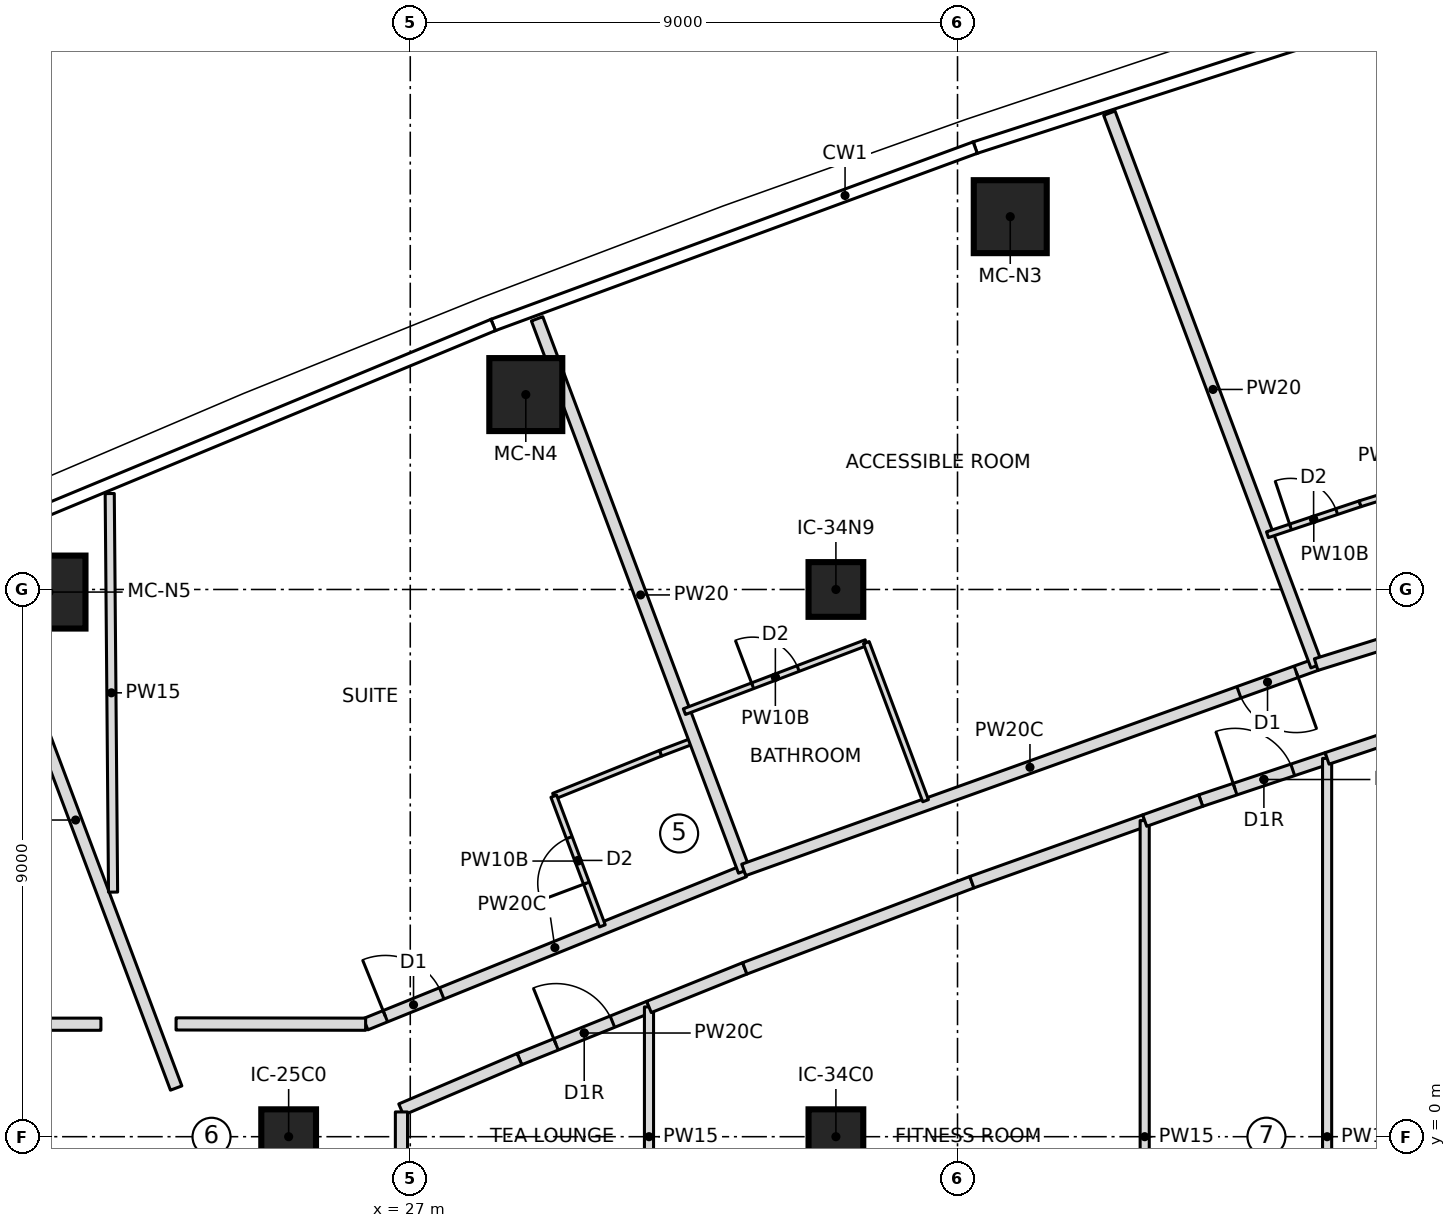
"""IFC4 building model, lengths in metres.
Left out: names, types, materials, properties, quantities, classifications, styles, units other than length and angle.
Written with IfcOpenShell. Run it as: python <this file> out.ifc"""

import sys

from ifc_helpers import new_model, si_unit, direction, frame, frame_2d, origin, origin_2d, place, context, subcontext, project, spatial, rectangle, extrude, element, fill, save


model = new_model("IFC4")
c1 = context("Model", 3, precision=1e-05, world=origin(), true_north=direction((0.0, 1.0)))
c2 = subcontext(c1, "Body", "Model", "MODEL_VIEW")
j1 = project(units=[si_unit("LENGTHUNIT", "METRE"), si_unit("PLANEANGLEUNIT", "RADIAN")], contexts=[c1])
p1 = place(None, origin())
s1 = spatial("IfcSite", under=j1, at=p1, CompositionType="ELEMENT")
p2 = place(p1, origin())
s2 = spatial("IfcBuilding", under=s1, at=p2, CompositionType="ELEMENT")
p3 = place(p2, frame((0.0, 0.0, 235.0)))
s3 = spatial("IfcBuildingStorey", under=s2, at=p3, CompositionType="ELEMENT", Elevation=235.0)
for number, where, z_axis, x_axis in (
    (1, (36.867, 15.132, 0.0), (0.0, 0.0, 1.0), (1.0, 0.0, 0.0)),
    (2, (28.9, 12.205, 0.0), (0.0, 0.0, 1.0), (1.0, 0.0, 0.0)),
    (3, (21.059, 8.958, 0.0), (0.0, 0.0, 1.0), (1.0, 0.0, 0.0)),
):
    element("IfcColumn", number, at=place(p3, frame(where, z_axis=z_axis, x_axis=x_axis)), inside=s3, PredefinedType="COLUMN", context=c2, shape_type="SweptSolid", body=[
        extrude(rectangle(XDim=1.2, YDim=1.2, at=origin_2d()), origin(), (0.0, 0.0, 1.0), 3.55),
    ])
for number, where, z_axis, x_axis in (
    (4, (25.0, 0.0, 0.0), (0.0, 0.0, 1.0), (1.0, 0.0, 0.0)),
    (5, (34.0, 0.0, 0.0), (0.0, 0.0, 1.0), (1.0, 0.0, 0.0)),
    (6, (34.0, 9.0, 0.0), (0.0, 0.0, 1.0), (1.0, 0.0, 0.0)),
):
    element("IfcColumn", number, at=place(p3, frame(where, z_axis=z_axis, x_axis=x_axis)), inside=s3, PredefinedType="COLUMN", context=c2, shape_type="SweptSolid", body=[
        extrude(rectangle(XDim=0.9, YDim=0.9, at=origin_2d()), origin(), (0.0, 0.0, 1.0), 3.55),
    ])
p4 = place(p3, frame((13.052, 1.85, 0.0), z_axis=(0.0, 0.0, 1.0), x_axis=(1.0, 0.0, 0.0)))
e7 = element("IfcWall", 7, at=p4, inside=s3, PredefinedType="PARTITIONING", context=c2, shape_type="SweptSolid", body=[
    extrude(rectangle(XDim=8.861, YDim=0.2, at=frame_2d((4.43, 0.0))), origin(), (0.0, 0.0, 1.0), 3.25),
])
p5 = place(p4, frame((3.93, 0.0, 0.0)))
e8 = element("IfcOpeningElement", 8, at=p5, cuts=e7, PredefinedType="OPENING", context=c2, shape_type="SweptSolid", body=[
    extrude(rectangle(XDim=1.0, YDim=2.1, at=frame_2d((0.5, 1.05))), frame((0.0, 0.11, 0.0), z_axis=(0.0, -1.0, 0.0), x_axis=(1.0, 0.0, 0.0)), (0.0, 0.0, 1.0), 0.22),
])
p6 = place(p3, frame((23.15, 0.8, 0.0), z_axis=(0.0, 0.0, 1.0), x_axis=(-0.351123441588, 0.936329177569, 0.0)))
e9 = element("IfcWall", 9, at=p6, inside=s3, PredefinedType="PARTITIONING", context=c2, shape_type="SweptSolid", body=[
    extrude(rectangle(XDim=9.416, YDim=0.2, at=frame_2d((4.708, 0.0))), origin(), (0.0, 0.0, 1.0), 3.25),
])
p7 = place(p3, frame((26.266, 1.85, 0.0), z_axis=(0.0, 0.0, 1.0), x_axis=(0.927007906702, 0.375041785555, 0.0)))
e10 = element("IfcWall", 10, at=p7, inside=s3, PredefinedType="PARTITIONING", context=c2, shape_type="SweptSolid", body=[
    extrude(rectangle(XDim=6.716, YDim=0.2, at=frame_2d((3.358, 0.0))), origin(), (0.0, 0.0, 1.0), 3.25),
])
p8 = place(p7, frame((0.35, 0.0, 0.0)))
e11 = element("IfcOpeningElement", 11, at=p8, cuts=e10, PredefinedType="OPENING", context=c2, shape_type="SweptSolid", body=[
    extrude(rectangle(XDim=1.0, YDim=2.1, at=frame_2d((0.5, 1.05))), frame((0.0, 0.11, 0.0), z_axis=(0.0, -1.0, 0.0), x_axis=(1.0, 0.0, 0.0)), (0.0, 0.0, 1.0), 0.22),
])
p9 = place(p3, frame((29.36, 5.6, 0.0), z_axis=(0.0, 0.0, 1.0), x_axis=(0.927594225674, 0.373589283166, 0.0)))
e12 = element("IfcWall", 12, at=p9, inside=s3, PredefinedType="PARTITIONING", context=c2, shape_type="SweptSolid", body=[
    extrude(rectangle(XDim=1.895, YDim=0.1, at=frame_2d((0.947, 0.0))), origin(), (0.0, 0.0, 1.0), 3.25),
])
p10 = place(p3, frame((31.117, 6.308, 0.0), z_axis=(0.0, 0.0, 1.0), x_axis=(0.935048188903, 0.354520640342, 0.0)))
e13 = element("IfcWall", 13, at=p10, inside=s3, PredefinedType="PARTITIONING", context=c2, shape_type="SweptSolid", body=[
    extrude(rectangle(XDim=0.606, YDim=0.1, at=frame_2d((0.303, 0.0))), origin(), (0.0, 0.0, 1.0), 3.25),
])
p11 = place(p3, frame((30.16, 3.467, 0.0), z_axis=(0.0, 0.0, 1.0), x_axis=(-0.351158682313, 0.936315961541, 0.0)))
e14 = element("IfcWall", 14, at=p11, inside=s3, PredefinedType="PARTITIONING", context=c2, shape_type="SweptSolid", body=[
    extrude(rectangle(XDim=2.278, YDim=0.1, at=frame_2d((1.139, 0.0))), origin(), (0.0, 0.0, 1.0), 3.25),
])
p12 = place(p11, frame((0.75, 0.0, 0.0)))
e15 = element("IfcOpeningElement", 15, at=p12, cuts=e14, PredefinedType="OPENING", context=c2, shape_type="SweptSolid", body=[
    extrude(rectangle(XDim=0.8, YDim=2.1, at=frame_2d((0.4, 1.05))), frame((0.0, 0.06, 0.0), z_axis=(0.0, -1.0, 0.0), x_axis=(1.0, 0.0, 0.0)), (0.0, 0.0, 1.0), 0.12),
])
p13 = place(p3, frame((32.492, 4.369, 0.0), z_axis=(0.0, 0.0, 1.0), x_axis=(-0.351128958016, 0.93632710889, 0.0)))
e16 = element("IfcWall", 16, at=p13, inside=s3, PredefinedType="PARTITIONING", context=c2, shape_type="SweptSolid", body=[
    extrude(rectangle(XDim=9.7, YDim=0.2, at=frame_2d((4.85, 0.0))), origin(), (0.0, 0.0, 1.0), 3.25),
])
p14 = place(p3, frame((41.898, 7.764, 0.0), z_axis=(0.0, 0.0, 1.0), x_axis=(-0.941277643829, -0.337633525034, 0.0)))
e17 = element("IfcWall", 17, at=p14, inside=s3, PredefinedType="PARTITIONING", context=c2, shape_type="SweptSolid", body=[
    extrude(rectangle(XDim=10.001, YDim=0.2, at=frame_2d((5.0, 0.0))), origin(), (0.0, 0.0, 1.0), 3.25),
])
p15 = place(p14, frame((0.35, 0.0, 0.0)))
e18 = element("IfcOpeningElement", 18, at=p15, cuts=e17, PredefinedType="OPENING", context=c2, shape_type="SweptSolid", body=[
    extrude(rectangle(XDim=1.0, YDim=2.1, at=frame_2d((0.5, 1.05))), frame((0.0, 0.11, 0.0), z_axis=(0.0, -1.0, 0.0), x_axis=(1.0, 0.0, 0.0)), (0.0, 0.0, 1.0), 0.22),
])
p16 = place(p3, frame((31.509, 6.991, 0.0), z_axis=(0.0, 0.0, 1.0), x_axis=(0.934948661714, 0.354783032232, 0.0)))
e19 = element("IfcWall", 19, at=p16, inside=s3, PredefinedType="PARTITIONING", context=c2, shape_type="SweptSolid", body=[
    extrude(rectangle(XDim=3.2, YDim=0.1, at=frame_2d((1.6, 0.0))), origin(), (0.0, 0.0, 1.0), 3.25),
])
p17 = place(p16, frame((1.2, 0.0, 0.0)))
e20 = element("IfcOpeningElement", 20, at=p17, cuts=e19, PredefinedType="OPENING", context=c2, shape_type="SweptSolid", body=[
    extrude(rectangle(XDim=0.8, YDim=2.1, at=frame_2d((0.4, 1.05))), frame((0.0, 0.06, 0.0), z_axis=(0.0, -1.0, 0.0), x_axis=(1.0, 0.0, 0.0)), (0.0, 0.0, 1.0), 0.12),
])
p18 = place(p3, frame((34.5, 8.126, 0.0), z_axis=(0.0, 0.0, 1.0), x_axis=(0.351065630332, -0.936350854755, 0.0)))
e21 = element("IfcWall", 21, at=p18, inside=s3, PredefinedType="PARTITIONING", context=c2, shape_type="SweptSolid", body=[
    extrude(rectangle(XDim=2.777, YDim=0.1, at=frame_2d((1.388, 0.0))), origin(), (0.0, 0.0, 1.0), 3.25),
])
p19 = place(p3, frame((41.906, 7.746, 0.0), z_axis=(0.0, 0.0, 1.0), x_axis=(-0.35112895446, 0.936327110224, 0.0)))
e22 = element("IfcWall", 22, at=p19, inside=s3, PredefinedType="PARTITIONING", context=c2, shape_type="SweptSolid", body=[
    extrude(rectangle(XDim=9.706, YDim=0.2, at=frame_2d((4.853, 0.0))), origin(), (0.0, 0.0, 1.0), 3.25),
])
p20 = place(p3, frame((41.097, 9.901, 0.0), z_axis=(0.0, 0.0, 1.0), x_axis=(0.948485479965, 0.3168206027, 0.0)))
e23 = element("IfcWall", 23, at=p20, inside=s3, PredefinedType="PARTITIONING", context=c2, shape_type="SweptSolid", body=[
    extrude(rectangle(XDim=1.606, YDim=0.1, at=frame_2d((0.803, 0.0))), origin(), (0.0, 0.0, 1.0), 3.25),
])
p21 = place(p20, frame((0.4, 0.0, 0.0)))
e24 = element("IfcOpeningElement", 24, at=p21, cuts=e23, PredefinedType="OPENING", context=c2, shape_type="SweptSolid", body=[
    extrude(rectangle(XDim=0.8, YDim=2.1, at=frame_2d((0.4, 1.05))), frame((0.0, 0.06, 0.0), z_axis=(0.0, -1.0, 0.0), x_axis=(1.0, 0.0, 0.0)), (0.0, 0.0, 1.0), 0.12),
])
p22 = place(p3, frame((42.621, 10.409, 0.0), z_axis=(0.0, 0.0, 1.0), x_axis=(0.954618903587, 0.297830067176, 0.0)))
e25 = element("IfcWall", 25, at=p22, inside=s3, PredefinedType="PARTITIONING", context=c2, shape_type="SweptSolid", body=[
    extrude(rectangle(XDim=0.531, YDim=0.1, at=frame_2d((0.266, 0.0))), origin(), (0.0, 0.0, 1.0), 3.25),
])
p23 = place(p3, frame((28.796, 1.276, 0.0), z_axis=(0.0, 0.0, 1.0), x_axis=(0.927609077038, 0.373552406224, 0.0)))
e26 = element("IfcWall", 26, at=p23, inside=s3, PredefinedType="PARTITIONING", context=c2, shape_type="SweptSolid", body=[
    extrude(rectangle(XDim=2.297, YDim=0.2, at=frame_2d((1.148, 0.0))), origin(), (0.0, 0.0, 1.0), 3.25),
])
p24 = place(p23, frame((0.648, 0.0, 0.0)))
e27 = element("IfcOpeningElement", 27, at=p24, cuts=e26, PredefinedType="OPENING", context=c2, shape_type="SweptSolid", body=[
    extrude(rectangle(XDim=1.0, YDim=2.1, at=frame_2d((0.5, 1.05))), frame((0.0, 0.11, 0.0), z_axis=(0.0, -1.0, 0.0), x_axis=(1.0, 0.0, 0.0)), (0.0, 0.0, 1.0), 0.22),
])
p25 = place(p3, frame((26.85, 0.447, 0.0), z_axis=(0.0, 0.0, 1.0), x_axis=(0.91990756443, 0.392135273732, 0.0)))
e28 = element("IfcWall", 28, at=p25, inside=s3, PredefinedType="PARTITIONING", context=c2, shape_type="SweptSolid", body=[
    extrude(rectangle(XDim=2.115, YDim=0.2, at=frame_2d((1.058, 0.0))), origin(), (0.0, 0.0, 1.0), 3.25),
])
p26 = place(p3, frame((30.926, -2.134, 0.0), z_axis=(0.0, 0.0, 1.0), x_axis=(0.0, 1.0, 0.0)))
e29 = element("IfcWall", 29, at=p26, inside=s3, PredefinedType="PARTITIONING", context=c2, shape_type="SweptSolid", body=[
    extrude(rectangle(XDim=4.268, YDim=0.15, at=frame_2d((2.134, 0.0))), origin(), (0.0, 0.0, 1.0), 3.25),
])
p27 = place(p3, frame((30.926, 2.134, 0.0), z_axis=(0.0, 0.0, 1.0), x_axis=(0.927641577565, 0.373471690456, 0.0)))
e30 = element("IfcWall", 30, at=p27, inside=s3, PredefinedType="PARTITIONING", context=c2, shape_type="SweptSolid", body=[
    extrude(rectangle(XDim=1.698, YDim=0.2, at=frame_2d((0.849, 0.0))), origin(), (0.0, 0.0, 1.0), 3.25),
])
p28 = place(p3, frame((32.501, 2.768, 0.0), z_axis=(0.0, 0.0, 1.0), x_axis=(0.934950696546, 0.354777669856, 0.0)))
e31 = element("IfcWall", 31, at=p28, inside=s3, PredefinedType="PARTITIONING", context=c2, shape_type="SweptSolid", body=[
    extrude(rectangle(XDim=3.995, YDim=0.2, at=frame_2d((1.997, 0.0))), origin(), (0.0, 0.0, 1.0), 3.25),
])
p29 = place(p3, frame((36.236, 4.186, 0.0), z_axis=(0.0, 0.0, 1.0), x_axis=(0.941908381697, 0.335869916023, 0.0)))
e32 = element("IfcWall", 32, at=p29, inside=s3, PredefinedType="PARTITIONING", context=c2, shape_type="SweptSolid", body=[
    extrude(rectangle(XDim=3.017, YDim=0.2, at=frame_2d((1.509, 0.0))), origin(), (0.0, 0.0, 1.0), 3.25),
])
p30 = place(p3, frame((39.078, -5.199, 0.0), z_axis=(0.0, 0.0, 1.0), x_axis=(0.0, 1.0, 0.0)))
e33 = element("IfcWall", 33, at=p30, inside=s3, PredefinedType="PARTITIONING", context=c2, shape_type="SweptSolid", body=[
    extrude(rectangle(XDim=10.398, YDim=0.15, at=frame_2d((5.199, 0.0))), origin(), (0.0, 0.0, 1.0), 3.25),
])
p31 = place(p3, frame((39.999, 5.527, 0.0), z_axis=(0.0, 0.0, 1.0), x_axis=(0.9484714727, 0.316862534034, 0.0)))
e34 = element("IfcWall", 34, at=p31, inside=s3, PredefinedType="PARTITIONING", context=c2, shape_type="SweptSolid", body=[
    extrude(rectangle(XDim=2.192, YDim=0.2, at=frame_2d((1.096, 0.0))), origin(), (0.0, 0.0, 1.0), 3.25),
])
p32 = place(p31, frame((0.596, 0.0, 0.0)))
e35 = element("IfcOpeningElement", 35, at=p32, cuts=e34, PredefinedType="OPENING", context=c2, shape_type="SweptSolid", body=[
    extrude(rectangle(XDim=1.0, YDim=2.1, at=frame_2d((0.5, 1.05))), frame((0.0, 0.11, 0.0), z_axis=(0.0, -1.0, 0.0), x_axis=(1.0, 0.0, 0.0)), (0.0, 0.0, 1.0), 0.22),
])
p33 = place(p3, frame((39.078, 5.199, 0.0), z_axis=(0.0, 0.0, 1.0), x_axis=(0.941911279377, 0.335861789704, 0.0)))
e36 = element("IfcWall", 36, at=p33, inside=s3, PredefinedType="PARTITIONING", context=c2, shape_type="SweptSolid", body=[
    extrude(rectangle(XDim=0.978, YDim=0.2, at=frame_2d((0.489, 0.0))), origin(), (0.0, 0.0, 1.0), 3.25),
])
p34 = place(p3, frame((42.078, -6.222, 0.0), z_axis=(0.0, 0.0, 1.0), x_axis=(0.0, 1.0, 0.0)))
e37 = element("IfcWall", 37, at=p34, inside=s3, PredefinedType="PARTITIONING", context=c2, shape_type="SweptSolid", body=[
    extrude(rectangle(XDim=12.444, YDim=0.15, at=frame_2d((6.222, 0.0))), origin(), (0.0, 0.0, 1.0), 3.25),
])
p35 = place(p3, frame((42.078, 6.222, 0.0), z_axis=(0.0, 0.0, 1.0), x_axis=(0.948466406859, 0.316877697323, 0.0)))
e38 = element("IfcWall", 38, at=p35, inside=s3, PredefinedType="PARTITIONING", context=c2, shape_type="SweptSolid", body=[
    extrude(rectangle(XDim=1.803, YDim=0.2, at=frame_2d((0.901, 0.0))), origin(), (0.0, 0.0, 1.0), 3.25),
])
p36 = place(p3, frame((22.057, 10.578, 0.0), z_axis=(0.0, 0.0, 1.0), x_axis=(0.008379594055, -0.999964890585, 0.0)))
e39 = element("IfcWall", 39, at=p36, inside=s3, PredefinedType="PARTITIONING", context=c2, shape_type="SweptSolid", body=[
    extrude(rectangle(XDim=6.555, YDim=0.15, at=frame_2d((3.278, 0.0))), origin(), (0.0, 0.0, 1.0), 3.25),
])
p37 = place(p3, frame((41.898, 7.764, 0.0), z_axis=(0.0, 0.0, 1.0), x_axis=(0.954667015156, 0.297675813886, 0.0)))
e40 = element("IfcWall", 40, at=p37, inside=s3, PredefinedType="PARTITIONING", context=c2, shape_type="SweptSolid", body=[
    extrude(rectangle(XDim=6.706, YDim=0.2, at=frame_2d((3.353, 0.0))), origin(), (0.0, 0.0, 1.0), 3.25),
])
p38 = place(p37, frame((3.95, 0.0, 0.0)))
e41 = element("IfcOpeningElement", 41, at=p38, cuts=e40, PredefinedType="OPENING", context=c2, shape_type="SweptSolid", body=[
    extrude(rectangle(XDim=1.5, YDim=2.1, at=frame_2d((0.75, 1.05))), frame((0.0, 0.11, 0.0), z_axis=(0.0, -1.0, 0.0), x_axis=(1.0, 0.0, 0.0)), (0.0, 0.0, 1.0), 0.22),
])
p39 = place(p3, frame((26.855, -0.407, 0.0), z_axis=(0.0, 0.0, 1.0), x_axis=(0.0, 1.0, 0.0)))
e42 = element("IfcWall", 42, at=p39, inside=s3, PredefinedType="PARTITIONING", context=c2, shape_type="SweptSolid", body=[
    extrude(rectangle(XDim=0.814, YDim=0.2, at=frame_2d((0.407, 0.0))), origin(), (0.0, 0.0, 1.0), 3.25),
])
p40 = place(p3, frame((26.266, 1.85, 0.0), z_axis=(0.0, 0.0, 1.0), x_axis=(-0.999998892962, 0.001487977051, 0.0)))
e43 = element("IfcWall", 43, at=p40, inside=s3, PredefinedType="PARTITIONING", context=c2, shape_type="SweptSolid", body=[
    extrude(rectangle(XDim=3.117, YDim=0.2, at=frame_2d((1.559, 0.0))), origin(), (0.0, 0.0, 1.0), 3.25),
])
p41 = place(p12, origin())
e44 = element("IfcDoor", 44, at=p41, inside=s3, OperationType="SINGLE_SWING_LEFT", PredefinedType="DOOR", context=c2, shape_type="SweptSolid", body=[
    extrude(rectangle(XDim=0.8, YDim=2.1, at=frame_2d((0.4, 1.05))), frame((0.0, 0.025, 0.0), z_axis=(0.0, -1.0, 0.0), x_axis=(1.0, 0.0, 0.0)), (0.0, 0.0, 1.0), 0.05),
])
fill(e15, e44)
p42 = place(p8, origin())
e45 = element("IfcDoor", 45, at=p42, inside=s3, OperationType="SINGLE_SWING_LEFT", PredefinedType="DOOR", context=c2, shape_type="SweptSolid", body=[
    extrude(rectangle(XDim=1.0, YDim=2.1, at=frame_2d((0.5, 1.05))), frame((0.0, 0.025, 0.0), z_axis=(0.0, -1.0, 0.0), x_axis=(1.0, 0.0, 0.0)), (0.0, 0.0, 1.0), 0.05),
])
fill(e11, e45)
p43 = place(p17, origin())
e46 = element("IfcDoor", 46, at=p43, inside=s3, OperationType="SINGLE_SWING_LEFT", PredefinedType="DOOR", context=c2, shape_type="SweptSolid", body=[
    extrude(rectangle(XDim=0.8, YDim=2.1, at=frame_2d((0.4, 1.05))), frame((0.0, 0.025, 0.0), z_axis=(0.0, -1.0, 0.0), x_axis=(1.0, 0.0, 0.0)), (0.0, 0.0, 1.0), 0.05),
])
fill(e20, e46)
p44 = place(p15, origin())
e47 = element("IfcDoor", 47, at=p44, inside=s3, OperationType="SINGLE_SWING_LEFT", PredefinedType="DOOR", context=c2, shape_type="SweptSolid", body=[
    extrude(rectangle(XDim=1.0, YDim=2.1, at=frame_2d((0.5, 1.05))), frame((0.0, 0.025, 0.0), z_axis=(0.0, -1.0, 0.0), x_axis=(1.0, 0.0, 0.0)), (0.0, 0.0, 1.0), 0.05),
])
fill(e18, e47)
p45 = place(p21, origin())
e48 = element("IfcDoor", 48, at=p45, inside=s3, OperationType="SINGLE_SWING_LEFT", PredefinedType="DOOR", context=c2, shape_type="SweptSolid", body=[
    extrude(rectangle(XDim=0.8, YDim=2.1, at=frame_2d((0.4, 1.05))), frame((0.0, 0.025, 0.0), z_axis=(0.0, -1.0, 0.0), x_axis=(1.0, 0.0, 0.0)), (0.0, 0.0, 1.0), 0.05),
])
fill(e24, e48)
p46 = place(p24, origin())
e49 = element("IfcDoor", 49, at=p46, inside=s3, OperationType="SINGLE_SWING_RIGHT", PredefinedType="DOOR", context=c2, shape_type="SweptSolid", body=[
    extrude(rectangle(XDim=1.0, YDim=2.1, at=frame_2d((0.5, 1.05))), frame((0.0, 0.025, 0.0), z_axis=(0.0, -1.0, 0.0), x_axis=(1.0, 0.0, 0.0)), (0.0, 0.0, 1.0), 0.05),
])
fill(e27, e49)
p47 = place(p32, origin())
e50 = element("IfcDoor", 50, at=p47, inside=s3, OperationType="SINGLE_SWING_RIGHT", PredefinedType="DOOR", context=c2, shape_type="SweptSolid", body=[
    extrude(rectangle(XDim=1.0, YDim=2.1, at=frame_2d((0.5, 1.05))), frame((0.0, 0.025, 0.0), z_axis=(0.0, -1.0, 0.0), x_axis=(1.0, 0.0, 0.0)), (0.0, 0.0, 1.0), 0.05),
])
fill(e35, e50)
save(model, sys.argv[1])
